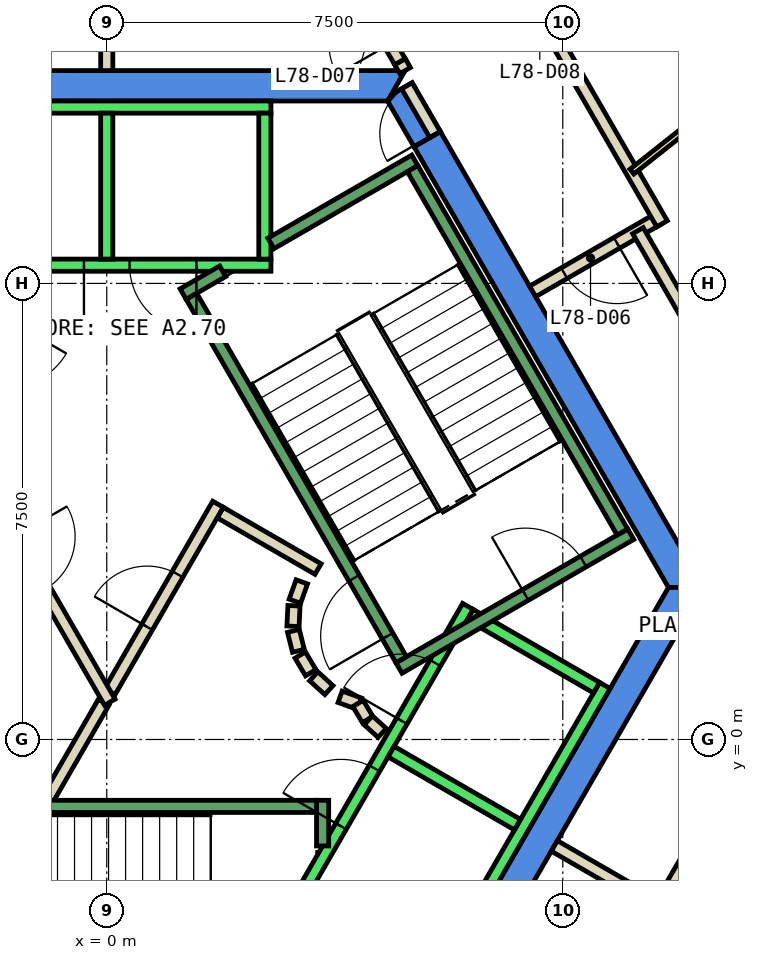
"""IFC4 building model, lengths in metres.
Left out: names, types, materials, properties, quantities, classifications, styles, units other than length and angle.
Written with IfcOpenShell. Run it as: python <this file> out.ifc"""

import sys

from ifc_helpers import new_model, si_unit, direction, frame, frame_2d, origin, place, context, subcontext, project, spatial, polyline, rectangle, outline, extrude, element, fill, save


model = new_model("IFC4")
c1 = context("Model", 3, precision=1e-05, world=origin(), true_north=direction((0.0, 1.0)))
c2 = subcontext(c1, "Body", "Model", "MODEL_VIEW")
j1 = project(units=[si_unit("LENGTHUNIT", "METRE"), si_unit("PLANEANGLEUNIT", "RADIAN")], contexts=[c1])
p1 = place(None, origin())
s1 = spatial("IfcSite", under=j1, at=p1, CompositionType="ELEMENT")
p2 = place(p1, origin())
s2 = spatial("IfcBuilding", under=s1, at=p2, CompositionType="ELEMENT")
p3 = place(p2, frame((0.0, 0.0, 331.4)))
s3 = spatial("IfcBuildingStorey", under=s2, at=p3, CompositionType="ELEMENT", Elevation=331.4)
p4 = place(p3, frame((0.0, 0.0, -0.45)))
e1 = element("IfcWall", 1, at=p4, inside=s3, PredefinedType="SHEAR", context=c2, shape_type="SweptSolid", body=[
    extrude(outline(polyline([(5.486, 9.998), (5.053, 9.748), (9.238, 2.5), (9.815, 2.5), (5.486, 9.998)])), origin(), (0.0, 0.0, 1.0), 4.6),
])
p5 = place(p3, frame((0.0, 0.0, 3.6)))
e2 = element("IfcWall", 2, at=p5, inside=s3, PredefinedType="SHEAR", context=c2, shape_type="SweptSolid", body=[
    extrude(outline(polyline([(5.022, 10.8), (4.677, 10.601), (4.619, 10.5), (5.053, 9.748), (5.486, 9.998), (5.022, 10.8)])), origin(), (0.0, 0.0, 1.0), 0.55),
])
p6 = place(p3, frame((0.0, 0.0, -0.45)))
e3 = element("IfcWall", 3, at=p6, inside=s3, PredefinedType="SHEAR", context=c2, shape_type="SweptSolid", body=[
    extrude(outline(polyline([(4.907, 11.0), (-4.907, 11.0), (-4.619, 10.5), (4.619, 10.5), (4.907, 11.0)])), origin(), (0.0, 0.0, 1.0), 4.6),
])
p7 = place(p3, frame((0.0, 0.0, -0.45)))
e4 = element("IfcWall", 4, at=p7, inside=s3, PredefinedType="SHEAR", context=c2, shape_type="SweptSolid", body=[
    extrude(outline(polyline([(4.907, -6.0), (9.815, 2.5), (9.238, 2.5), (4.619, -5.5), (4.907, -6.0)])), origin(), (0.0, 0.0, 1.0), 4.6),
])
p8 = place(p3, frame((-0.982, -1.0, 0.0), z_axis=(0.0, 0.0, 1.0), x_axis=(0.50024047865, 0.865886518847, 0.0)))
e5 = element("IfcWall", 5, at=p8, inside=s3, PredefinedType="PARTITIONING", context=c2, shape_type="SweptSolid", body=[
    extrude(rectangle(XDim=1.863, YDim=0.2, at=frame_2d((0.931, 0.0))), origin(), (0.0, 0.0, 1.0), 4.15),
])
p9 = place(p3, frame((1.866, 3.732, 0.0), z_axis=(0.0, 0.0, 1.0), x_axis=(0.866043361281, -0.499968895414, 0.0)))
e6 = element("IfcWall", 6, at=p9, inside=s3, PredefinedType="PARTITIONING", context=c2, shape_type="SweptSolid", body=[
    extrude(rectangle(XDim=1.858, YDim=0.2, at=frame_2d((0.929, 0.0))), origin(), (0.0, 0.0, 1.0), 4.15),
])
p10 = place(p3, frame((3.208, 2.592, 0.0), z_axis=(0.0, 0.0, 1.0), x_axis=(-0.337388820924, -0.941365382578, 0.0)))
e7 = element("IfcWall", 7, at=p10, inside=s3, PredefinedType="PARTITIONING", context=c2, shape_type="SweptSolid", body=[
    extrude(rectangle(XDim=0.338, YDim=0.2, at=frame_2d((0.169, 0.0))), origin(), (0.0, 0.0, 1.0), 4.15),
])
p11 = place(p3, frame((3.079, 2.199, 0.0), z_axis=(0.0, 0.0, 1.0), x_axis=(-0.047771483479, -0.998858290933, 0.0)))
e8 = element("IfcWall", 8, at=p11, inside=s3, PredefinedType="PARTITIONING", context=c2, shape_type="SweptSolid", body=[
    extrude(rectangle(XDim=0.337, YDim=0.2, at=frame_2d((0.169, 0.0))), origin(), (0.0, 0.0, 1.0), 4.15),
])
p12 = place(p3, frame((3.07, 1.786, 0.0), z_axis=(0.0, 0.0, 1.0), x_axis=(0.242705583207, -0.970099994784, 0.0)))
e9 = element("IfcWall", 9, at=p12, inside=s3, PredefinedType="PARTITIONING", context=c2, shape_type="SweptSolid", body=[
    extrude(rectangle(XDim=0.338, YDim=0.2, at=frame_2d((0.169, 0.0))), origin(), (0.0, 0.0, 1.0), 4.15),
])
for number, where, z_axis, x_axis in (
    (10, (3.182, 1.388, 0.0), (0.0, 0.0, 1.0), (0.512, -0.859, 0.0)),
    (11, (3.404, 1.039, 0.0), (0.0, 0.0, 1.0), (0.74, -0.672, 0.0)),
):
    element("IfcWall", number, at=place(p3, frame(where, z_axis=z_axis, x_axis=x_axis)), inside=s3, PredefinedType="PARTITIONING", context=c2, shape_type="SweptSolid", body=[
        extrude(rectangle(XDim=0.338, YDim=0.2, at=frame_2d((0.169, 0.0))), origin(), (0.0, 0.0, 1.0), 4.15),
    ])
p13 = place(p3, frame((3.838, 0.702, 0.0), z_axis=(0.0, 0.0, 1.0), x_axis=(0.941035081519, -0.338308993895, 0.0)))
e12 = element("IfcWall", 12, at=p13, inside=s3, PredefinedType="PARTITIONING", context=c2, shape_type="SweptSolid", body=[
    extrude(rectangle(XDim=0.337, YDim=0.2, at=frame_2d((0.168, 0.0))), origin(), (0.0, 0.0, 1.0), 4.15),
])
p14 = place(p3, frame((4.132, 0.593, 0.0), z_axis=(0.0, 0.0, 1.0), x_axis=(0.513561617048, -0.858052717201, 0.0)))
e13 = element("IfcWall", 13, at=p14, inside=s3, PredefinedType="PARTITIONING", context=c2, shape_type="SweptSolid", body=[
    extrude(rectangle(XDim=0.308, YDim=0.2, at=frame_2d((0.154, 0.0))), origin(), (0.0, 0.0, 1.0), 4.15),
])
p15 = place(p3, frame((4.301, 0.315, 0.0), z_axis=(0.0, 0.0, 1.0), x_axis=(0.741798017506, -0.670623367639, 0.0)))
e14 = element("IfcWall", 14, at=p15, inside=s3, PredefinedType="PARTITIONING", context=c2, shape_type="SweptSolid", body=[
    extrude(rectangle(XDim=0.309, YDim=0.2, at=frame_2d((0.154, 0.0))), origin(), (0.0, 0.0, 1.0), 4.15),
])
p16 = place(p3, frame((0.05, 0.787, 0.0), z_axis=(0.0, 0.0, 1.0), x_axis=(0.499954076797, 0.866051915934, 0.0)))
e15 = element("IfcWall", 15, at=p16, inside=s3, PredefinedType="PARTITIONING", context=c2, shape_type="SweptSolid", body=[
    extrude(rectangle(XDim=3.558, YDim=0.2, at=frame_2d((1.779, 0.0))), origin(), (0.0, 0.0, 1.0), 4.15),
])
p17 = place(p16, frame((1.229, 0.0, 0.0)))
e16 = element("IfcOpeningElement", 16, at=p17, cuts=e15, PredefinedType="OPENING", context=c2, shape_type="SweptSolid", body=[
    extrude(rectangle(XDim=1.0, YDim=2.1, at=frame_2d((0.5, 1.05))), frame((0.0, 0.11, 0.0), z_axis=(0.0, -1.0, 0.0), x_axis=(1.0, 0.0, 0.0)), (0.0, 0.0, 1.0), 0.22),
])
p18 = place(p3, frame((-2.54, 5.1, 0.0), z_axis=(0.0, 0.0, 1.0), x_axis=(0.499925051871, -0.866068670783, 0.0)))
e17 = element("IfcWall", 17, at=p18, inside=s3, PredefinedType="PARTITIONING", context=c2, shape_type="SweptSolid", body=[
    extrude(rectangle(XDim=5.181, YDim=0.2, at=frame_2d((2.59, 0.0))), origin(), (0.0, 0.0, 1.0), 4.15),
])
p19 = place(p18, frame((2.04, 0.0, 0.0)))
e18 = element("IfcOpeningElement", 18, at=p19, cuts=e17, PredefinedType="OPENING", context=c2, shape_type="SweptSolid", body=[
    extrude(rectangle(XDim=1.0, YDim=2.1, at=frame_2d((0.5, 1.05))), frame((0.0, 0.11, 0.0), z_axis=(0.0, -1.0, 0.0), x_axis=(1.0, 0.0, 0.0)), (0.0, 0.0, 1.0), 0.22),
])
p20 = place(p3, frame((7.361, -1.75, 0.0), z_axis=(0.0, 0.0, 1.0), x_axis=(0.865980106173, -0.500078449558, 0.0)))
e19 = element("IfcWall", 19, at=p20, inside=s3, PredefinedType="PARTITIONING", context=c2, shape_type="SweptSolid", body=[
    extrude(rectangle(XDim=1.9, YDim=0.2, at=frame_2d((0.95, 0.0))), origin(), (0.0, 0.0, 1.0), 4.15),
])
p21 = place(p3, frame((9.082, 8.568, 0.0), z_axis=(0.0, 0.0, 1.0), x_axis=(-0.865955154139, -0.50012165622, 0.0)))
e20 = element("IfcWall", 20, at=p21, inside=s3, PredefinedType="PARTITIONING", context=c2, shape_type="SweptSolid", body=[
    extrude(rectangle(XDim=2.4, YDim=0.2, at=frame_2d((1.2, 0.0))), origin(), (0.0, 0.0, 1.0), 4.15),
])
p22 = place(p21, frame((0.8, 0.0, 0.0)))
e21 = element("IfcOpeningElement", 21, at=p22, cuts=e20, PredefinedType="OPENING", context=c2, shape_type="SweptSolid", body=[
    extrude(rectangle(XDim=1.0, YDim=2.1, at=frame_2d((0.5, 1.05))), frame((0.0, 0.11, 0.0), z_axis=(0.0, -1.0, 0.0), x_axis=(1.0, 0.0, 0.0)), (0.0, 0.0, 1.0), 0.22),
])
p23 = place(p3, frame((4.907, 11.0, 0.0), z_axis=(0.0, 0.0, 1.0), x_axis=(-0.5004692653, 0.865754303766, 0.0)))
e22 = element("IfcWall", 22, at=p23, inside=s3, PredefinedType="PARTITIONING", context=c2, shape_type="SweptSolid", body=[
    extrude(rectangle(XDim=0.17, YDim=0.2, at=frame_2d((0.085, 0.0))), origin(), (0.0, 0.0, 1.0), 2.4),
])
p24 = place(p3, frame((5.532, 14.717, 0.0), z_axis=(0.0, 0.0, 1.0), x_axis=(0.499968011863, -0.866043871356, 0.0)))
e23 = element("IfcWall", 23, at=p24, inside=s3, PredefinedType="PARTITIONING", context=c2, shape_type="SweptSolid", body=[
    extrude(rectangle(XDim=7.201, YDim=0.2, at=frame_2d((3.6, 0.0))), origin(), (0.0, 0.0, 1.0), 4.15),
])
p25 = place(p24, frame((2.68, 0.0, 0.0)))
e24 = element("IfcOpeningElement", 24, at=p25, cuts=e23, PredefinedType="OPENING", context=c2, shape_type="SweptSolid", body=[
    extrude(rectangle(XDim=1.0, YDim=2.1, at=frame_2d((0.5, 1.05))), frame((0.0, 0.11, 0.0), z_axis=(0.0, -1.0, 0.0), x_axis=(1.0, 0.0, 0.0)), (0.0, 0.0, 1.0), 0.22),
])
p26 = place(p3, frame((8.736, 8.368, 0.0), z_axis=(0.0, 0.0, 1.0), x_axis=(0.499995994493, -0.866027716353, 0.0)))
e25 = element("IfcWall", 25, at=p26, inside=s3, PredefinedType="PARTITIONING", context=c2, shape_type="SweptSolid", body=[
    extrude(rectangle(XDim=6.876, YDim=0.2, at=frame_2d((3.438, 0.0))), origin(), (0.0, 0.0, 1.0), 4.15),
])
p27 = place(p26, frame((5.726, 0.0, 0.0)))
e26 = element("IfcOpeningElement", 26, at=p27, cuts=e25, PredefinedType="OPENING", context=c2, shape_type="SweptSolid", body=[
    extrude(rectangle(XDim=1.0, YDim=2.1, at=frame_2d((0.5, 1.05))), frame((0.0, 0.11, 0.0), z_axis=(0.0, -1.0, 0.0), x_axis=(1.0, 0.0, 0.0)), (0.0, 0.0, 1.0), 0.22),
])
p28 = place(p3, frame((12.074, 2.413, 0.0), z_axis=(0.0, 0.0, 1.0), x_axis=(-0.499974029402, -0.866040397397, 0.0)))
e27 = element("IfcWall", 27, at=p28, inside=s3, PredefinedType="PARTITIONING", context=c2, shape_type="SweptSolid", body=[
    extrude(rectangle(XDim=5.936, YDim=0.2, at=frame_2d((2.968, 0.0))), origin(), (0.0, 0.0, 1.0), 4.15),
])
p29 = place(p3, frame((0.0, 11.0, 0.0), z_axis=(0.0, 0.0, 1.0), x_axis=(0.0, 1.0, 0.0)))
e28 = element("IfcWall", 28, at=p29, inside=s3, PredefinedType="PARTITIONING", context=c2, shape_type="SweptSolid", body=[
    extrude(rectangle(XDim=1.9, YDim=0.2, at=frame_2d((0.95, 0.0))), origin(), (0.0, 0.0, 1.0), 4.15),
])
p30 = place(p3, frame((11.808, 11.849, 0.0), z_axis=(0.0, 0.0, 1.0), x_axis=(-0.784103353093, -0.620630269701, 0.0)))
e29 = element("IfcWall", 29, at=p30, inside=s3, PredefinedType="PARTITIONING", context=c2, shape_type="SweptSolid", body=[
    extrude(rectangle(XDim=4.044, YDim=0.1, at=frame_2d((2.022, 0.0))), origin(), (0.0, 0.0, 1.0), 4.15),
])
p31 = place(p3, frame((5.399, 9.948, 0.0), z_axis=(0.0, 0.0, 1.0), x_axis=(-0.499882215713, 0.866093395895, 0.0)))
e30 = element("IfcWall", 30, at=p31, inside=s3, PredefinedType="PARTITIONING", context=c2, shape_type="SweptSolid", body=[
    extrude(rectangle(XDim=0.926, YDim=0.2, at=frame_2d((0.463, 0.0))), origin(), (0.0, 0.0, 1.0), 2.4),
])
p32 = place(p31, frame((0.017, 0.0, 0.0)))
e31 = element("IfcOpeningElement", 31, at=p32, cuts=e30, PredefinedType="OPENING", context=c2, shape_type="SweptSolid", body=[
    extrude(rectangle(XDim=0.9, YDim=2.1, at=frame_2d((0.45, 1.05))), frame((0.0, 0.11, 0.0), z_axis=(0.0, -1.0, 0.0), x_axis=(1.0, 0.0, 0.0)), (0.0, 0.0, 1.0), 0.22),
])
p33 = place(p3, frame((4.822, 11.147, 0.0), z_axis=(0.0, 0.0, 1.0), x_axis=(-0.499871764879, 0.866099427708, 0.0)))
e32 = element("IfcWall", 32, at=p33, inside=s3, PredefinedType="PARTITIONING", context=c2, shape_type="SweptSolid", body=[
    extrude(rectangle(XDim=2.737, YDim=0.2, at=frame_2d((1.368, 0.0))), origin(), (0.0, 0.0, 1.0), 4.15),
])
p34 = place(p33, frame((0.335, 0.0, 0.0)))
e33 = element("IfcOpeningElement", 33, at=p34, cuts=e32, PredefinedType="OPENING", context=c2, shape_type="SweptSolid", body=[
    extrude(rectangle(XDim=1.0, YDim=2.1, at=frame_2d((0.5, 1.05))), frame((0.0, 0.11, 0.0), z_axis=(0.0, -1.0, 0.0), x_axis=(1.0, 0.0, 0.0)), (0.0, 0.0, 1.0), 0.22),
])
p35 = place(p3, frame((2.7, 7.8, 0.0), z_axis=(0.0, 0.0, 1.0), x_axis=(-1.0, 0.0, 0.0)))
e34 = element("IfcWall", 34, at=p35, inside=s3, PredefinedType="STANDARD", context=c2, shape_type="SweptSolid", body=[
    extrude(rectangle(XDim=5.4, YDim=0.2, at=frame_2d((2.7, 0.0))), origin(), (0.0, 0.0, 1.0), 4.15),
])
p36 = place(p35, frame((1.225, 0.0, 0.0)))
e35 = element("IfcOpeningElement", 35, at=p36, cuts=e34, PredefinedType="OPENING", context=c2, shape_type="SweptSolid", body=[
    extrude(rectangle(XDim=1.1, YDim=2.1, at=frame_2d((0.55, 1.05))), frame((0.0, 0.11, 0.0), z_axis=(0.0, -1.0, 0.0), x_axis=(1.0, 0.0, 0.0)), (0.0, 0.0, 1.0), 0.22),
])
p37 = place(p35, frame((3.075, 0.0, 0.0)))
e36 = element("IfcOpeningElement", 36, at=p37, cuts=e34, PredefinedType="OPENING", context=c2, shape_type="SweptSolid", body=[
    extrude(rectangle(XDim=1.1, YDim=2.1, at=frame_2d((0.55, 1.05))), frame((0.0, 0.11, 0.0), z_axis=(0.0, -1.0, 0.0), x_axis=(1.0, 0.0, 0.0)), (0.0, 0.0, 1.0), 0.22),
])
p38 = place(p3, frame((2.7, 10.4, 0.0), z_axis=(0.0, 0.0, 1.0), x_axis=(-1.0, 0.0, 0.0)))
e37 = element("IfcWall", 37, at=p38, inside=s3, PredefinedType="STANDARD", context=c2, shape_type="SweptSolid", body=[
    extrude(rectangle(XDim=5.4, YDim=0.2, at=frame_2d((2.7, 0.0))), origin(), (0.0, 0.0, 1.0), 4.15),
])
for number, where, z_axis, x_axis in (
    (38, (2.6, 7.9, 0.0), (0.0, 0.0, 1.0), (0.0, 1.0, 0.0)),
    (39, (0.0, 7.9, 0.0), (0.0, 0.0, 1.0), (0.0, 1.0, 0.0)),
):
    element("IfcWall", number, at=place(p3, frame(where, z_axis=z_axis, x_axis=x_axis)), inside=s3, PredefinedType="STANDARD", context=c2, shape_type="SweptSolid", body=[
        extrude(rectangle(XDim=2.4, YDim=0.2, at=frame_2d((1.2, 0.0))), origin(), (0.0, 0.0, 1.0), 4.15),
    ])
p39 = place(p3, frame((3.24, -2.488, 0.0), z_axis=(0.0, 0.0, 1.0), x_axis=(0.500034260056, 0.866005622828, 0.0)))
e40 = element("IfcWall", 40, at=p39, inside=s3, PredefinedType="STANDARD", context=c2, shape_type="SweptSolid", body=[
    extrude(rectangle(XDim=5.399, YDim=0.2, at=frame_2d((2.7, 0.0))), origin(), (0.0, 0.0, 1.0), 4.15),
])
p40 = place(p39, frame((3.225, 0.0, 0.0)))
e41 = element("IfcOpeningElement", 41, at=p40, cuts=e40, PredefinedType="OPENING", context=c2, shape_type="SweptSolid", body=[
    extrude(rectangle(XDim=1.1, YDim=2.1, at=frame_2d((0.55, 1.05))), frame((0.0, 0.11, 0.0), z_axis=(0.0, -1.0, 0.0), x_axis=(1.0, 0.0, 0.0)), (0.0, 0.0, 1.0), 0.22),
])
p41 = place(p39, frame((1.225, 0.0, 0.0)))
e42 = element("IfcOpeningElement", 42, at=p41, cuts=e40, PredefinedType="OPENING", context=c2, shape_type="SweptSolid", body=[
    extrude(rectangle(XDim=1.1, YDim=2.1, at=frame_2d((0.55, 1.05))), frame((0.0, 0.11, 0.0), z_axis=(0.0, -1.0, 0.0), x_axis=(1.0, 0.0, 0.0)), (0.0, 0.0, 1.0), 0.22),
])
p42 = place(p3, frame((5.492, -3.788, 0.0), z_axis=(0.0, 0.0, 1.0), x_axis=(0.500034260056, 0.866005622828, 0.0)))
e43 = element("IfcWall", 43, at=p42, inside=s3, PredefinedType="STANDARD", context=c2, shape_type="SweptSolid", body=[
    extrude(rectangle(XDim=5.399, YDim=0.2, at=frame_2d((2.7, 0.0))), origin(), (0.0, 0.0, 1.0), 4.15),
])
for number, where, z_axis, x_axis in (
    (44, (4.677, -0.2, 0.0), (0.0, 0.0, 1.0), (0.866, -0.5, 0.0)),
    (45, (5.977, 2.052, 0.0), (0.0, 0.0, 1.0), (0.866, -0.5, 0.0)),
):
    element("IfcWall", number, at=place(p3, frame(where, z_axis=z_axis, x_axis=x_axis)), inside=s3, PredefinedType="STANDARD", context=c2, shape_type="SweptSolid", body=[
        extrude(rectangle(XDim=2.399, YDim=0.2, at=frame_2d((1.2, 0.0))), origin(), (0.0, 0.0, 1.0), 4.15),
    ])
p43 = place(p3, frame((3.55, -1.0, 0.0), z_axis=(0.0, 0.0, 1.0), x_axis=(0.0, -1.0, 0.0)))
e46 = element("IfcWall", 46, at=p43, inside=s3, PredefinedType="STANDARD", context=c2, shape_type="SweptSolid", body=[
    extrude(rectangle(XDim=0.751, YDim=0.2, at=frame_2d((0.375, 0.0))), origin(), (0.0, 0.0, 1.0), 4.15),
])
p44 = place(p3, frame((-3.45, -1.1, 0.0), z_axis=(0.0, 0.0, 1.0), x_axis=(1.0, 0.0, 0.0)))
e47 = element("IfcWall", 47, at=p44, inside=s3, PredefinedType="STANDARD", context=c2, shape_type="SweptSolid", body=[
    extrude(rectangle(XDim=6.9, YDim=0.2, at=frame_2d((3.45, 0.0))), origin(), (0.0, 0.0, 1.0), 4.15),
])
p45 = place(p44, frame((0.45, 0.0, 0.0)))
e48 = element("IfcOpeningElement", 48, at=p45, cuts=e47, PredefinedType="OPENING", context=c2, shape_type="SweptSolid", body=[
    extrude(rectangle(XDim=1.1, YDim=2.2, at=frame_2d((0.55, 1.1))), frame((0.0, 0.11, 0.0), z_axis=(0.0, -1.0, 0.0), x_axis=(1.0, 0.0, 0.0)), (0.0, 0.0, 1.0), 0.22),
])
p46 = place(p3, frame((4.806, 1.176, 0.0), z_axis=(0.0, 0.0, 1.0), x_axis=(0.866059941101, 0.499940174841, 0.0)))
e49 = element("IfcWall", 49, at=p46, inside=s3, PredefinedType="STANDARD", context=c2, shape_type="SweptSolid", body=[
    extrude(rectangle(XDim=4.4, YDim=0.2, at=frame_2d((2.2, 0.0))), origin(), (0.0, 0.0, 1.0), 4.15),
])
p47 = place(p46, frame((2.4, 0.0, 0.0)))
e50 = element("IfcOpeningElement", 50, at=p47, cuts=e49, PredefinedType="OPENING", context=c2, shape_type="SweptSolid", body=[
    extrude(rectangle(XDim=1.1, YDim=2.2, at=frame_2d((0.55, 1.1))), frame((0.0, 0.11, 0.0), z_axis=(0.0, -1.0, 0.0), x_axis=(1.0, 0.0, 0.0)), (0.0, 0.0, 1.0), 0.22),
])
p48 = place(p3, frame((2.7, 8.158, 0.0), z_axis=(0.0, 0.0, 1.0), x_axis=(0.86611865017, 0.499838457731, 0.0)))
e51 = element("IfcWall", 51, at=p48, inside=s3, PredefinedType="STANDARD", context=c2, shape_type="SweptSolid", body=[
    extrude(rectangle(XDim=2.733, YDim=0.2, at=frame_2d((1.366, 0.0))), origin(), (0.0, 0.0, 1.0), 4.15),
])
p49 = place(p3, frame((1.256, 7.324, 0.0), z_axis=(0.0, 0.0, 1.0), x_axis=(0.865915093549, 0.500191014278, 0.0)))
e52 = element("IfcWall", 52, at=p49, inside=s3, PredefinedType="STANDARD", context=c2, shape_type="SweptSolid", body=[
    extrude(rectangle(XDim=0.752, YDim=0.2, at=frame_2d((0.376, 0.0))), origin(), (0.0, 0.0, 1.0), 4.15),
])
p50 = place(p3, frame((4.843, 1.312, 0.0), z_axis=(0.0, 0.0, 1.0), x_axis=(-0.499963383562, 0.866046543262, 0.0)))
e53 = element("IfcWall", 53, at=p50, inside=s3, PredefinedType="STANDARD", context=c2, shape_type="SweptSolid", body=[
    extrude(rectangle(XDim=6.9, YDim=0.2, at=frame_2d((3.45, 0.0))), origin(), (0.0, 0.0, 1.0), 4.15),
])
p51 = place(p50, frame((0.45, 0.0, 0.0)))
e54 = element("IfcOpeningElement", 54, at=p51, cuts=e53, PredefinedType="OPENING", context=c2, shape_type="SweptSolid", body=[
    extrude(rectangle(XDim=1.1, YDim=2.2, at=frame_2d((0.55, 1.1))), frame((0.0, 0.11, 0.0), z_axis=(0.0, -1.0, 0.0), x_axis=(1.0, 0.0, 0.0)), (0.0, 0.0, 1.0), 0.22),
])
p52 = place(p3, frame((8.48, 3.412, 0.0), z_axis=(0.0, 0.0, 1.0), x_axis=(-0.499978703459, 0.866037698999, 0.0)))
e55 = element("IfcWall", 55, at=p52, inside=s3, PredefinedType="STANDARD", context=c2, shape_type="SweptSolid", body=[
    extrude(rectangle(XDim=6.9, YDim=0.2, at=frame_2d((3.45, 0.0))), origin(), (0.0, 0.0, 1.0), 4.15),
])
p53 = place(p22, origin())
e56 = element("IfcDoor", 56, at=p53, inside=s3, OperationType="SINGLE_SWING_LEFT", PredefinedType="DOOR", context=c2, shape_type="SweptSolid", body=[
    extrude(rectangle(XDim=1.0, YDim=2.1, at=frame_2d((0.5, 1.05))), frame((0.0, 0.025, 0.0), z_axis=(0.0, -1.0, 0.0), x_axis=(1.0, 0.0, 0.0)), (0.0, 0.0, 1.0), 0.05),
])
fill(e21, e56)
p54 = place(p17, origin())
e57 = element("IfcDoor", 57, at=p54, inside=s3, OperationType="SINGLE_SWING_RIGHT", PredefinedType="DOOR", context=c2, shape_type="SweptSolid", body=[
    extrude(rectangle(XDim=1.0, YDim=2.1, at=frame_2d((0.5, 1.05))), frame((0.0, 0.025, 0.0), z_axis=(0.0, -1.0, 0.0), x_axis=(1.0, 0.0, 0.0)), (0.0, 0.0, 1.0), 0.05),
])
fill(e16, e57)
p55 = place(p32, origin())
e58 = element("IfcDoor", 58, at=p55, inside=s3, OperationType="SINGLE_SWING_LEFT", PredefinedType="DOOR", context=c2, shape_type="SweptSolid", body=[
    extrude(rectangle(XDim=0.9, YDim=2.1, at=frame_2d((0.45, 1.05))), frame((0.0, 0.025, 0.0), z_axis=(0.0, -1.0, 0.0), x_axis=(1.0, 0.0, 0.0)), (0.0, 0.0, 1.0), 0.05),
])
fill(e31, e58)
p56 = place(p36, origin())
e59 = element("IfcDoor", 59, at=p56, inside=s3, OperationType="SLIDING_TO_LEFT", PredefinedType="DOOR", context=c2, shape_type="SweptSolid", body=[
    extrude(rectangle(XDim=1.1, YDim=2.1, at=frame_2d((0.55, 1.05))), frame((0.0, 0.025, 0.0), z_axis=(0.0, -1.0, 0.0), x_axis=(1.0, 0.0, 0.0)), (0.0, 0.0, 1.0), 0.05),
])
fill(e35, e59)
p57 = place(p37, origin())
e60 = element("IfcDoor", 60, at=p57, inside=s3, OperationType="SLIDING_TO_LEFT", PredefinedType="DOOR", context=c2, shape_type="SweptSolid", body=[
    extrude(rectangle(XDim=1.1, YDim=2.1, at=frame_2d((0.55, 1.05))), frame((0.0, 0.025, 0.0), z_axis=(0.0, -1.0, 0.0), x_axis=(1.0, 0.0, 0.0)), (0.0, 0.0, 1.0), 0.05),
])
fill(e36, e60)
p58 = place(p40, origin())
e61 = element("IfcDoor", 61, at=p58, inside=s3, OperationType="SLIDING_TO_LEFT", PredefinedType="DOOR", context=c2, shape_type="SweptSolid", body=[
    extrude(rectangle(XDim=1.1, YDim=2.1, at=frame_2d((0.55, 1.05))), frame((0.0, 0.025, 0.0), z_axis=(0.0, -1.0, 0.0), x_axis=(1.0, 0.0, 0.0)), (0.0, 0.0, 1.0), 0.05),
])
fill(e41, e61)
p59 = place(p41, origin())
e62 = element("IfcDoor", 62, at=p59, inside=s3, OperationType="SLIDING_TO_LEFT", PredefinedType="DOOR", context=c2, shape_type="SweptSolid", body=[
    extrude(rectangle(XDim=1.1, YDim=2.1, at=frame_2d((0.55, 1.05))), frame((0.0, 0.025, 0.0), z_axis=(0.0, -1.0, 0.0), x_axis=(1.0, 0.0, 0.0)), (0.0, 0.0, 1.0), 0.05),
])
fill(e42, e62)
p60 = place(p51, origin())
e63 = element("IfcDoor", 63, at=p60, inside=s3, OperationType="SINGLE_SWING_LEFT", PredefinedType="DOOR", context=c2, shape_type="SweptSolid", body=[
    extrude(rectangle(XDim=1.1, YDim=2.2, at=frame_2d((0.55, 1.1))), frame((0.0, 0.025, 0.0), z_axis=(0.0, -1.0, 0.0), x_axis=(1.0, 0.0, 0.0)), (0.0, 0.0, 1.0), 0.05),
])
fill(e54, e63)
p61 = place(p47, origin())
e64 = element("IfcDoor", 64, at=p61, inside=s3, OperationType="SINGLE_SWING_LEFT", PredefinedType="DOOR", context=c2, shape_type="SweptSolid", body=[
    extrude(rectangle(XDim=1.1, YDim=2.2, at=frame_2d((0.55, 1.1))), frame((0.0, 0.025, 0.0), z_axis=(0.0, -1.0, 0.0), x_axis=(1.0, 0.0, 0.0)), (0.0, 0.0, 1.0), 0.05),
])
fill(e50, e64)
save(model, sys.argv[1])
